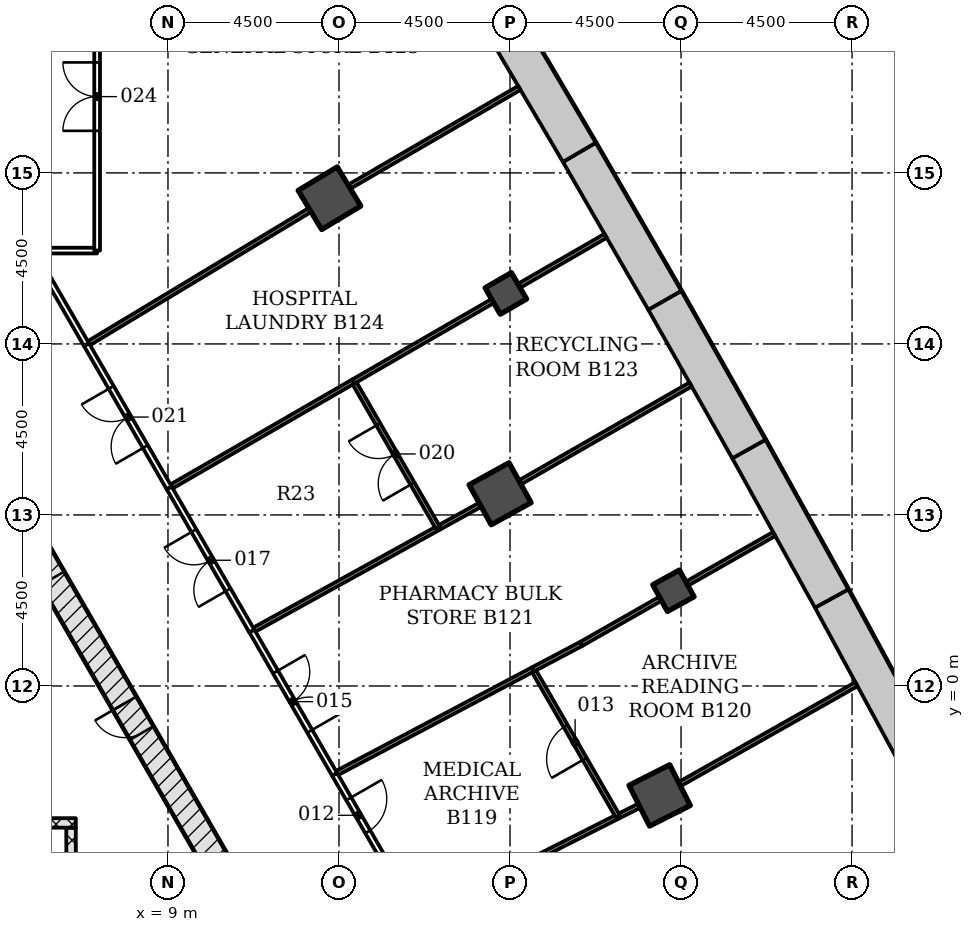
"""IFC4 building model, lengths in metres.
Left out: names, types, materials, properties, quantities, classifications, styles, units other than length and angle.
Written with IfcOpenShell. Run it as: python <this file> out.ifc"""

import sys

from ifc_helpers import new_model, si_unit, direction, frame, frame_2d, origin, origin_2d, place, context, subcontext, project, spatial, polyline, rectangle, outline, extrude, element, fill, save


model = new_model("IFC4")
c1 = context("Model", 3, precision=1e-05, world=origin(), true_north=direction((0.0, 1.0)))
c2 = subcontext(c1, "Body", "Model", "MODEL_VIEW")
j1 = project(units=[si_unit("LENGTHUNIT", "METRE"), si_unit("PLANEANGLEUNIT", "RADIAN")], contexts=[c1])
p1 = place(None, origin())
s1 = spatial("IfcSite", under=j1, at=p1, CompositionType="ELEMENT")
p2 = place(p1, origin())
s2 = spatial("IfcBuilding", under=s1, at=p2, CompositionType="ELEMENT")
p3 = place(p2, frame((0.0, 0.0, -4.5)))
s3 = spatial("IfcBuildingStorey", under=s2, at=p3, CompositionType="ELEMENT", Elevation=-4.5)
p4 = place(p3, origin())
e1 = element("IfcWall", 1, at=p4, inside=s3, PredefinedType="SOLIDWALL", context=c2, shape_type="SweptSolid", body=[
    extrude(outline(polyline([(29.045, -1.415), (26.901, 2.542), (26.024, 2.062), (28.164, -1.887), (29.045, -1.415)])), origin(), (0.0, 0.0, 1.0), 4.25),
])
p5 = place(p3, origin())
e2 = element("IfcWall", 2, at=p5, inside=s3, PredefinedType="SOLIDWALL", context=c2, shape_type="SweptSolid", body=[
    extrude(outline(polyline([(26.901, 2.542), (24.721, 6.479), (23.848, 5.99), (26.024, 2.062), (26.901, 2.542)])), origin(), (0.0, 0.0, 1.0), 4.25),
])
p6 = place(p3, origin())
e3 = element("IfcWall", 3, at=p6, inside=s3, PredefinedType="SOLIDWALL", context=c2, shape_type="SweptSolid", body=[
    extrude(outline(polyline([(24.721, 6.479), (22.506, 10.396), (21.638, 9.9), (23.848, 5.99), (24.721, 6.479)])), origin(), (0.0, 0.0, 1.0), 4.25),
])
p7 = place(p3, origin())
e4 = element("IfcWall", 4, at=p7, inside=s3, PredefinedType="SOLIDWALL", context=c2, shape_type="SweptSolid", body=[
    extrude(outline(polyline([(22.506, 10.396), (20.256, 14.293), (19.393, 13.789), (21.638, 9.9), (22.506, 10.396)])), origin(), (0.0, 0.0, 1.0), 4.25),
])
p8 = place(p3, origin())
e5 = element("IfcWall", 5, at=p8, inside=s3, PredefinedType="SOLIDWALL", context=c2, shape_type="SweptSolid", body=[
    extrude(outline(polyline([(20.256, 14.293), (17.971, 18.17), (17.112, 17.658), (19.393, 13.789), (20.256, 14.293)])), origin(), (0.0, 0.0, 1.0), 4.25),
])
for number, where, z_axis, x_axis in (
    (6, (21.937, -2.88, -0.3), (0.0, 0.0, 1.0), (0.893, 0.451, 0.0)),
    (7, (17.739, 5.058, -0.3), (0.0, 0.0, 1.0), (0.875, 0.484, 0.0)),
    (8, (13.25, 12.834, -0.3), (0.0, 0.0, 1.0), (0.857, 0.516, 0.0)),
):
    element("IfcColumn", number, at=place(p3, frame(where, z_axis=z_axis, x_axis=x_axis)), inside=s3, PredefinedType="COLUMN", context=c2, shape_type="SweptSolid", body=[
        extrude(rectangle(XDim=1.2, YDim=1.2, at=origin_2d()), origin(), (0.0, 0.0, 1.0), 4.55),
    ])
for number, where, z_axis, x_axis in (
    (9, (22.3, 2.506, -0.3), (0.0, 0.0, 1.0), (0.876, 0.482, 0.0)),
    (10, (17.89, 10.329, -0.3), (0.0, 0.0, 1.0), (0.866, 0.5, 0.0)),
):
    element("IfcColumn", number, at=place(p3, frame(where, z_axis=z_axis, x_axis=x_axis)), inside=s3, PredefinedType="COLUMN", context=c2, shape_type="SweptSolid", body=[
        extrude(rectangle(XDim=0.8, YDim=0.8, at=origin_2d()), origin(), (0.0, 0.0, 1.0), 4.55),
    ])
p9 = place(p3, frame((8.926, -6.753, -0.3), z_axis=(0.0, 0.0, 1.0), x_axis=(0.500042739161, 0.866000726912, 0.0)))
e11 = element("IfcWall", 11, at=p9, inside=s3, PredefinedType="SHEAR", context=c2, shape_type="SweptSolid", body=[
    extrude(rectangle(XDim=2.771, YDim=0.7, at=frame_2d((1.386, 0.0))), origin(), (0.0, 0.0, 1.0), 4.55),
])
p10 = place(p3, frame((10.311, -4.703, -0.3), z_axis=(0.0, 0.0, 1.0), x_axis=(-0.500001446645, 0.866024568562, 0.0)))
e12 = element("IfcWall", 12, at=p10, inside=s3, PredefinedType="SHEAR", context=c2, shape_type="SweptSolid", body=[
    extrude(rectangle(XDim=18.458, YDim=0.7, at=frame_2d((9.229, 0.0))), origin(), (0.0, 0.0, 1.0), 4.55),
])
p11 = place(p10, frame((8.7, 0.0, 0.3)))
e13 = element("IfcOpeningElement", 13, at=p11, cuts=e12, PredefinedType="OPENING", context=c2, shape_type="SweptSolid", body=[
    extrude(rectangle(XDim=1.0, YDim=2.1, at=frame_2d((0.5, 1.05))), frame((0.0, 0.36, 0.0), z_axis=(0.0, -1.0, 0.0), x_axis=(1.0, 0.0, 0.0)), (0.0, 0.0, 1.0), 0.72),
])
p12 = place(p10, frame((4.002, 0.0, 0.3)))
e14 = element("IfcOpeningElement", 14, at=p12, cuts=e12, PredefinedType="OPENING", context=c2, shape_type="SweptSolid", body=[
    extrude(rectangle(XDim=0.9, YDim=2.1, at=frame_2d((0.45, 1.05))), frame((0.0, 0.36, 0.0), z_axis=(0.0, -1.0, 0.0), x_axis=(1.0, 0.0, 0.0)), (0.0, 0.0, 1.0), 0.72),
])
p13 = place(p10, frame((14.093, 0.0, 0.3)))
e15 = element("IfcOpeningElement", 15, at=p13, cuts=e12, PredefinedType="OPENING", context=c2, shape_type="SweptSolid", body=[
    extrude(rectangle(XDim=0.9, YDim=2.1, at=frame_2d((0.45, 1.05))), frame((0.0, 0.36, 0.0), z_axis=(0.0, -1.0, 0.0), x_axis=(1.0, 0.0, 0.0)), (0.0, 0.0, 1.0), 0.72),
])
p14 = place(p3, frame((6.45, -6.228, 0.0), z_axis=(0.0, 0.0, 1.0), x_axis=(0.0, 1.0, 0.0)))
e16 = element("IfcWall", 16, at=p14, inside=s3, PredefinedType="PARTITIONING", context=c2, shape_type="SweptSolid", body=[
    extrude(rectangle(XDim=2.5, YDim=0.25, at=frame_2d((1.25, 0.0))), origin(), (0.0, 0.0, 1.0), 4.25),
])
p15 = place(p3, frame((-6.575, -3.603, 0.0), z_axis=(0.0, 0.0, 1.0), x_axis=(1.0, 0.0, 0.0)))
e17 = element("IfcWall", 17, at=p15, inside=s3, PredefinedType="PARTITIONING", context=c2, shape_type="SweptSolid", body=[
    extrude(rectangle(XDim=13.15, YDim=0.25, at=frame_2d((6.575, 0.0))), origin(), (0.0, 0.0, 1.0), 4.25),
])
p16 = place(p3, frame((20.836, -3.436, 0.0), z_axis=(0.0, 0.0, 1.0), x_axis=(-0.89244304116, -0.451160080554, 0.0)))
e18 = element("IfcWall", 18, at=p16, inside=s3, PredefinedType="PARTITIONING", context=c2, shape_type="SweptSolid", body=[
    extrude(rectangle(XDim=6.204, YDim=0.12, at=frame_2d((3.102, 0.0))), origin(), (0.0, 0.0, 1.0), 3.638),
])
p17 = place(p3, frame((21.401, -3.151, 0.0), z_axis=(0.0, 0.0, 1.0), x_axis=(-0.892323275748, -0.45139691133, 0.0)))
e19 = element("IfcWall", 19, at=p17, inside=s3, PredefinedType="PARTITIONING", context=c2, shape_type="SweptSolid", body=[
    extrude(rectangle(XDim=0.63, YDim=0.12, at=frame_2d((0.315, 0.0))), origin(), (0.0, 0.0, 1.0), 3.638),
])
p18 = place(p3, frame((27.116, 0.047, 0.0), z_axis=(0.0, 0.0, 1.0), x_axis=(-0.87056283872, -0.492057256668, 0.0)))
e20 = element("IfcWall", 20, at=p18, inside=s3, PredefinedType="PARTITIONING", context=c2, shape_type="SweptSolid", body=[
    extrude(rectangle(XDim=5.347, YDim=0.12, at=frame_2d((2.674, 0.0))), origin(), (0.0, 0.0, 1.0), 3.633),
])
p19 = place(p3, frame((20.838, -3.435, 0.0), z_axis=(0.0, 0.0, 1.0), x_axis=(-0.499911633214, 0.866076416361, 0.0)))
e21 = element("IfcWall", 21, at=p19, inside=s3, PredefinedType="PARTITIONING", context=c2, shape_type="SweptSolid", body=[
    extrude(rectangle(XDim=4.469, YDim=0.12, at=frame_2d((2.234, 0.0))), origin(), (0.0, 0.0, 1.0), 3.638),
])
p20 = place(p19, frame((1.75, 0.0, 0.0)))
e22 = element("IfcOpeningElement", 22, at=p20, cuts=e21, PredefinedType="OPENING", context=c2, shape_type="SweptSolid", body=[
    extrude(rectangle(XDim=1.0, YDim=2.1, at=frame_2d((0.5, 1.05))), frame((0.0, 0.07, 0.0), z_axis=(0.0, -1.0, 0.0), x_axis=(1.0, 0.0, 0.0)), (0.0, 0.0, 1.0), 0.14),
])
p21 = place(p3, frame((18.606, 0.437, 0.0), z_axis=(0.0, 0.0, 1.0), x_axis=(-0.884037119688, -0.467416699544, 0.0)))
e23 = element("IfcWall", 23, at=p21, inside=s3, PredefinedType="PARTITIONING", context=c2, shape_type="SweptSolid", body=[
    extrude(rectangle(XDim=5.907, YDim=0.12, at=frame_2d((2.954, 0.0))), origin(), (0.0, 0.0, 1.0), 3.638),
])
p22 = place(p3, frame((13.382, -2.321, 0.0), z_axis=(0.0, 0.0, 1.0), x_axis=(0.500076401611, -0.8659812888, 0.0)))
e24 = element("IfcWall", 24, at=p22, inside=s3, PredefinedType="PARTITIONING", context=c2, shape_type="SweptSolid", body=[
    extrude(rectangle(XDim=2.547, YDim=0.15, at=frame_2d((1.274, 0.0))), origin(), (0.0, 0.0, 1.0), 3.638),
])
p23 = place(p22, frame((0.75, 0.0, 0.0)))
e25 = element("IfcOpeningElement", 25, at=p23, cuts=e24, PredefinedType="OPENING", context=c2, shape_type="SweptSolid", body=[
    extrude(rectangle(XDim=1.0, YDim=2.1, at=frame_2d((0.5, 1.05))), frame((0.0, 0.085, 0.0), z_axis=(0.0, -1.0, 0.0), x_axis=(1.0, 0.0, 0.0)), (0.0, 0.0, 1.0), 0.17),
])
p24 = place(p3, frame((21.959, 2.295, 0.0), z_axis=(0.0, 0.0, 1.0), x_axis=(-0.868831589773, -0.49510773435, 0.0)))
e26 = element("IfcWall", 26, at=p24, inside=s3, PredefinedType="PARTITIONING", context=c2, shape_type="SweptSolid", body=[
    extrude(rectangle(XDim=2.397, YDim=0.12, at=frame_2d((1.199, 0.0))), origin(), (0.0, 0.0, 1.0), 3.638),
])
p25 = place(p3, frame((19.875, 1.108, 0.0), z_axis=(0.0, 0.0, 1.0), x_axis=(-0.884108929341, -0.467280858863, 0.0)))
e27 = element("IfcWall", 27, at=p25, inside=s3, PredefinedType="PARTITIONING", context=c2, shape_type="SweptSolid", body=[
    extrude(rectangle(XDim=1.442, YDim=0.12, at=frame_2d((0.721, 0.0))), origin(), (0.0, 0.0, 1.0), 3.638),
])
p26 = place(p3, frame((24.951, 3.999, 0.0), z_axis=(0.0, 0.0, 1.0), x_axis=(-0.868958412069, -0.494885116057, 0.0)))
e28 = element("IfcWall", 28, at=p26, inside=s3, PredefinedType="PARTITIONING", context=c2, shape_type="SweptSolid", body=[
    extrude(rectangle(XDim=2.643, YDim=0.12, at=frame_2d((1.322, 0.0))), origin(), (0.0, 0.0, 1.0), 4.25),
])
p27 = place(p3, frame((11.205, 1.45, 0.0), z_axis=(0.0, 0.0, 1.0), x_axis=(0.500058412813, -0.865991676505, 0.0)))
e29 = element("IfcWall", 29, at=p27, inside=s3, PredefinedType="PARTITIONING", context=c2, shape_type="SweptSolid", body=[
    extrude(rectangle(XDim=4.361, YDim=0.15, at=frame_2d((2.181, 0.0))), origin(), (0.0, 0.0, 1.0), 3.638),
])
p28 = place(p27, frame((1.25, 0.0, 0.0)))
e30 = element("IfcOpeningElement", 30, at=p28, cuts=e29, PredefinedType="OPENING", context=c2, shape_type="SweptSolid", body=[
    extrude(rectangle(XDim=1.8, YDim=2.1, at=frame_2d((0.9, 1.05))), frame((0.0, 0.085, 0.0), z_axis=(0.0, -1.0, 0.0), x_axis=(1.0, 0.0, 0.0)), (0.0, 0.0, 1.0), 0.17),
])
p29 = place(p3, frame((16.108, 4.155, 0.0), z_axis=(0.0, 0.0, 1.0), x_axis=(-0.87515505143, -0.483842573526, 0.0)))
e31 = element("IfcWall", 31, at=p29, inside=s3, PredefinedType="PARTITIONING", context=c2, shape_type="SweptSolid", body=[
    extrude(rectangle(XDim=5.599, YDim=0.12, at=frame_2d((2.799, 0.0))), origin(), (0.0, 0.0, 1.0), 3.638),
])
p30 = place(p3, frame((17.214, 4.767, 0.0), z_axis=(0.0, 0.0, 1.0), x_axis=(-0.875140294724, -0.483869263904, 0.0)))
e32 = element("IfcWall", 32, at=p30, inside=s3, PredefinedType="PARTITIONING", context=c2, shape_type="SweptSolid", body=[
    extrude(rectangle(XDim=1.263, YDim=0.12, at=frame_2d((0.631, 0.0))), origin(), (0.0, 0.0, 1.0), 3.638),
])
p31 = place(p3, frame((22.751, 7.932, 0.0), z_axis=(0.0, 0.0, 1.0), x_axis=(-0.867438170848, -0.497544992695, 0.0)))
e33 = element("IfcWall", 33, at=p31, inside=s3, PredefinedType="PARTITIONING", context=c2, shape_type="SweptSolid", body=[
    extrude(rectangle(XDim=5.177, YDim=0.12, at=frame_2d((2.589, 0.0))), origin(), (0.0, 0.0, 1.0), 3.633),
])
p32 = place(p3, frame((11.206, 1.446, 0.0), z_axis=(0.0, 0.0, 1.0), x_axis=(-0.500044734646, 0.865999574684, 0.0)))
e34 = element("IfcWall", 34, at=p32, inside=s3, PredefinedType="PARTITIONING", context=c2, shape_type="SweptSolid", body=[
    extrude(rectangle(XDim=4.35, YDim=0.15, at=frame_2d((2.175, 0.0))), origin(), (0.0, 0.0, 1.0), 3.638),
])
p33 = place(p32, frame((1.25, 0.0, 0.0)))
e35 = element("IfcOpeningElement", 35, at=p33, cuts=e34, PredefinedType="OPENING", context=c2, shape_type="SweptSolid", body=[
    extrude(rectangle(XDim=1.8, YDim=2.1, at=frame_2d((0.9, 1.05))), frame((0.0, 0.085, 0.0), z_axis=(0.0, -1.0, 0.0), x_axis=(1.0, 0.0, 0.0)), (0.0, 0.0, 1.0), 0.17),
])
p34 = place(p3, frame((9.03, 5.214, 0.0), z_axis=(0.0, 0.0, 1.0), x_axis=(-0.499876332206, 0.866096791646, 0.0)))
e36 = element("IfcWall", 36, at=p34, inside=s3, PredefinedType="PARTITIONING", context=c2, shape_type="SweptSolid", body=[
    extrude(rectangle(XDim=4.349, YDim=0.15, at=frame_2d((2.175, 0.0))), origin(), (0.0, 0.0, 1.0), 3.638),
])
p35 = place(p34, frame((1.25, 0.0, 0.0)))
e37 = element("IfcOpeningElement", 37, at=p35, cuts=e36, PredefinedType="OPENING", context=c2, shape_type="SweptSolid", body=[
    extrude(rectangle(XDim=1.8, YDim=2.1, at=frame_2d((0.9, 1.05))), frame((0.0, 0.085, 0.0), z_axis=(0.0, -1.0, 0.0), x_axis=(1.0, 0.0, 0.0)), (0.0, 0.0, 1.0), 0.17),
])
p36 = place(p3, frame((6.855, 8.982, 0.0), z_axis=(0.0, 0.0, 1.0), x_axis=(-0.500176439337, 0.865923512519, 0.0)))
e38 = element("IfcWall", 38, at=p36, inside=s3, PredefinedType="PARTITIONING", context=c2, shape_type="SweptSolid", body=[
    extrude(rectangle(XDim=2.855, YDim=0.15, at=frame_2d((1.427, 0.0))), origin(), (0.0, 0.0, 1.0), 3.638),
])
p37 = place(p3, frame((5.427, 11.456, 0.0), z_axis=(0.0, 0.0, 1.0), x_axis=(1.0, 0.0, 0.0)))
e39 = element("IfcWall", 39, at=p37, inside=s3, PredefinedType="PARTITIONING", context=c2, shape_type="SweptSolid", body=[
    extrude(rectangle(XDim=1.708, YDim=0.15, at=frame_2d((0.854, 0.0))), origin(), (0.0, 0.0, 1.0), 4.25),
])
p38 = place(p3, frame((7.136, 11.457, 0.0), z_axis=(0.0, 0.0, 1.0), x_axis=(0.0, 1.0, 0.0)))
e40 = element("IfcWall", 40, at=p38, inside=s3, PredefinedType="PARTITIONING", context=c2, shape_type="SweptSolid", body=[
    extrude(rectangle(XDim=8.106, YDim=0.15, at=frame_2d((4.053, 0.0))), origin(), (0.0, 0.0, 1.0), 3.638),
])
p39 = place(p38, frame((3.15, 0.0, 0.0)))
e41 = element("IfcOpeningElement", 41, at=p39, cuts=e40, PredefinedType="OPENING", context=c2, shape_type="SweptSolid", body=[
    extrude(rectangle(XDim=1.8, YDim=2.1, at=frame_2d((0.9, 1.05))), frame((0.0, 0.085, 0.0), z_axis=(0.0, -1.0, 0.0), x_axis=(1.0, 0.0, 0.0)), (0.0, 0.0, 1.0), 0.17),
])
p40 = place(p3, frame((16.107, 4.156, 0.0), z_axis=(0.0, 0.0, 1.0), x_axis=(-0.499836357881, 0.866119861994, 0.0)))
e42 = element("IfcWall", 42, at=p40, inside=s3, PredefinedType="PARTITIONING", context=c2, shape_type="SweptSolid", body=[
    extrude(rectangle(XDim=4.453, YDim=0.12, at=frame_2d((2.227, 0.0))), origin(), (0.0, 0.0, 1.0), 3.638),
])
p41 = place(p40, frame((1.35, 0.0, 0.0)))
e43 = element("IfcOpeningElement", 43, at=p41, cuts=e42, PredefinedType="OPENING", context=c2, shape_type="SweptSolid", body=[
    extrude(rectangle(XDim=1.8, YDim=2.1, at=frame_2d((0.9, 1.05))), frame((0.0, 0.07, 0.0), z_axis=(0.0, -1.0, 0.0), x_axis=(1.0, 0.0, 0.0)), (0.0, 0.0, 1.0), 0.14),
])
p42 = place(p3, frame((13.885, 8.016, 0.0), z_axis=(0.0, 0.0, 1.0), x_axis=(-0.866017266313, -0.500014094249, 0.0)))
e44 = element("IfcWall", 44, at=p42, inside=s3, PredefinedType="PARTITIONING", context=c2, shape_type="SweptSolid", body=[
    extrude(rectangle(XDim=5.604, YDim=0.12, at=frame_2d((2.802, 0.0))), origin(), (0.0, 0.0, 1.0), 3.638),
])
p43 = place(p3, frame((17.543, 10.128, 0.0), z_axis=(0.0, 0.0, 1.0), x_axis=(-0.865987734199, -0.50006523996, 0.0)))
e45 = element("IfcWall", 45, at=p43, inside=s3, PredefinedType="PARTITIONING", context=c2, shape_type="SweptSolid", body=[
    extrude(rectangle(XDim=4.233, YDim=0.12, at=frame_2d((2.117, 0.0))), origin(), (0.0, 0.0, 1.0), 3.638),
])
p44 = place(p3, frame((20.515, 11.844, 0.0), z_axis=(0.0, 0.0, 1.0), x_axis=(-0.865984721421, -0.500070457302, 0.0)))
e46 = element("IfcWall", 46, at=p44, inside=s3, PredefinedType="PARTITIONING", context=c2, shape_type="SweptSolid", body=[
    extrude(rectangle(XDim=2.631, YDim=0.12, at=frame_2d((1.316, 0.0))), origin(), (0.0, 0.0, 1.0), 4.25),
])
p45 = place(p3, frame((12.736, 12.524, 0.0), z_axis=(0.0, 0.0, 1.0), x_axis=(-0.856559377083, -0.516048479827, 0.0)))
e47 = element("IfcWall", 47, at=p45, inside=s3, PredefinedType="PARTITIONING", context=c2, shape_type="SweptSolid", body=[
    extrude(rectangle(XDim=6.864, YDim=0.12, at=frame_2d((3.432, 0.0))), origin(), (0.0, 0.0, 1.0), 3.638),
])
p46 = place(p3, frame((18.245, 15.736, 0.0), z_axis=(0.0, 0.0, 1.0), x_axis=(-0.864615819332, -0.502433562734, 0.0)))
e48 = element("IfcWall", 48, at=p46, inside=s3, PredefinedType="PARTITIONING", context=c2, shape_type="SweptSolid", body=[
    extrude(rectangle(XDim=5.177, YDim=0.12, at=frame_2d((2.588, 0.0))), origin(), (0.0, 0.0, 1.0), 3.633),
])
p47 = place(p11, origin())
e49 = element("IfcDoor", 49, at=p47, inside=s3, OperationType="SINGLE_SWING_LEFT", PredefinedType="DOOR", context=c2, shape_type="SweptSolid", body=[
    extrude(rectangle(XDim=1.0, YDim=2.1, at=frame_2d((0.5, 1.05))), frame((0.0, 0.075, 0.0), z_axis=(0.0, -1.0, 0.0), x_axis=(1.0, 0.0, 0.0)), (0.0, 0.0, 1.0), 0.15),
])
fill(e13, e49)
p48 = place(p12, origin())
e50 = element("IfcDoor", 50, at=p48, inside=s3, OperationType="SINGLE_SWING_RIGHT", PredefinedType="DOOR", context=c2, shape_type="SweptSolid", body=[
    extrude(rectangle(XDim=0.9, YDim=2.1, at=frame_2d((0.45, 1.05))), frame((0.0, 0.075, 0.0), z_axis=(0.0, -1.0, 0.0), x_axis=(1.0, 0.0, 0.0)), (0.0, 0.0, 1.0), 0.15),
])
fill(e14, e50)
p49 = place(p23, origin())
e51 = element("IfcDoor", 51, at=p49, inside=s3, OperationType="SINGLE_SWING_LEFT", PredefinedType="DOOR", context=c2, shape_type="SweptSolid", body=[
    extrude(rectangle(XDim=1.0, YDim=2.1, at=frame_2d((0.5, 1.05))), frame((0.0, 0.025, 0.0), z_axis=(0.0, -1.0, 0.0), x_axis=(1.0, 0.0, 0.0)), (0.0, 0.0, 1.0), 0.05),
])
fill(e25, e51)
p50 = place(p20, origin())
e52 = element("IfcDoor", 52, at=p50, inside=s3, OperationType="SINGLE_SWING_LEFT", PredefinedType="DOOR", context=c2, shape_type="SweptSolid", body=[
    extrude(rectangle(XDim=1.0, YDim=2.1, at=frame_2d((0.5, 1.05))), frame((0.0, 0.025, 0.0), z_axis=(0.0, -1.0, 0.0), x_axis=(1.0, 0.0, 0.0)), (0.0, 0.0, 1.0), 0.05),
])
fill(e22, e52)
p51 = place(p28, origin())
e53 = element("IfcDoor", 53, at=p51, inside=s3, OperationType="DOUBLE_DOOR_SINGLE_SWING", PredefinedType="DOOR", context=c2, shape_type="SweptSolid", body=[
    extrude(rectangle(XDim=1.8, YDim=2.1, at=frame_2d((0.9, 1.05))), frame((0.0, 0.025, 0.0), z_axis=(0.0, -1.0, 0.0), x_axis=(1.0, 0.0, 0.0)), (0.0, 0.0, 1.0), 0.05),
])
fill(e30, e53)
p52 = place(p33, origin())
e54 = element("IfcDoor", 54, at=p52, inside=s3, OperationType="DOUBLE_DOOR_SINGLE_SWING", PredefinedType="DOOR", context=c2, shape_type="SweptSolid", body=[
    extrude(rectangle(XDim=1.8, YDim=2.1, at=frame_2d((0.9, 1.05))), frame((0.0, 0.025, 0.0), z_axis=(0.0, -1.0, 0.0), x_axis=(1.0, 0.0, 0.0)), (0.0, 0.0, 1.0), 0.05),
])
fill(e35, e54)
p53 = place(p41, origin())
e55 = element("IfcDoor", 55, at=p53, inside=s3, OperationType="DOUBLE_DOOR_SINGLE_SWING", PredefinedType="DOOR", context=c2, shape_type="SweptSolid", body=[
    extrude(rectangle(XDim=1.8, YDim=2.1, at=frame_2d((0.9, 1.05))), frame((0.0, 0.025, 0.0), z_axis=(0.0, -1.0, 0.0), x_axis=(1.0, 0.0, 0.0)), (0.0, 0.0, 1.0), 0.05),
])
fill(e43, e55)
p54 = place(p35, origin())
e56 = element("IfcDoor", 56, at=p54, inside=s3, OperationType="DOUBLE_DOOR_SINGLE_SWING", PredefinedType="DOOR", context=c2, shape_type="SweptSolid", body=[
    extrude(rectangle(XDim=1.8, YDim=2.1, at=frame_2d((0.9, 1.05))), frame((0.0, 0.025, 0.0), z_axis=(0.0, -1.0, 0.0), x_axis=(1.0, 0.0, 0.0)), (0.0, 0.0, 1.0), 0.05),
])
fill(e37, e56)
p55 = place(p39, origin())
e57 = element("IfcDoor", 57, at=p55, inside=s3, OperationType="DOUBLE_DOOR_SINGLE_SWING", PredefinedType="DOOR", context=c2, shape_type="SweptSolid", body=[
    extrude(rectangle(XDim=1.8, YDim=2.1, at=frame_2d((0.9, 1.05))), frame((0.0, 0.025, 0.0), z_axis=(0.0, -1.0, 0.0), x_axis=(1.0, 0.0, 0.0)), (0.0, 0.0, 1.0), 0.05),
])
fill(e41, e57)
save(model, sys.argv[1])
